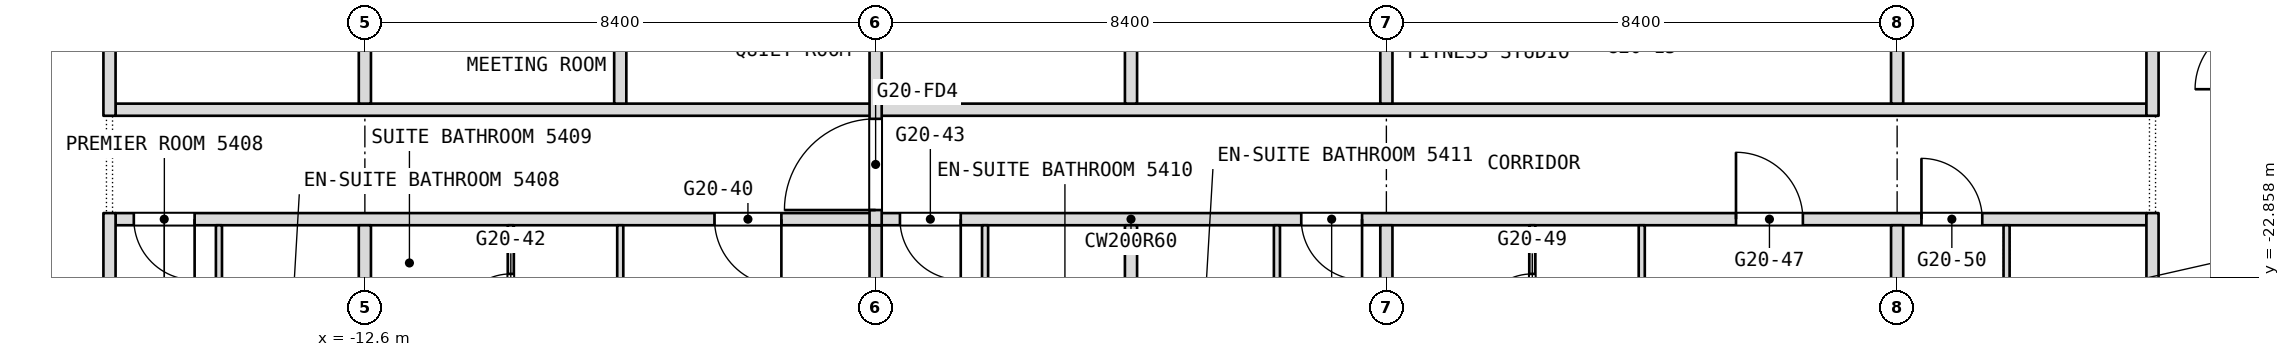
"""IFC4 building model, lengths in metres.
Left out: names, types, materials, properties, quantities, classifications, styles, units other than length and angle.
Written with IfcOpenShell. Run it as: python <this file> out.ifc"""

import sys

from ifc_helpers import new_model, si_unit, direction, frame, frame_2d, origin, place, context, subcontext, project, spatial, rectangle, extrude, element, fill, save


model = new_model("IFC4")
c1 = context("Model", 3, precision=1e-05, world=origin(), true_north=direction((0.0, 1.0)))
c2 = subcontext(c1, "Body", "Model", "MODEL_VIEW")
j1 = project(units=[si_unit("LENGTHUNIT", "METRE"), si_unit("PLANEANGLEUNIT", "RADIAN")], contexts=[c1])
p1 = place(None, origin())
s1 = spatial("IfcSite", under=j1, at=p1, CompositionType="ELEMENT")
p2 = place(p1, origin())
s2 = spatial("IfcBuilding", under=s1, at=p2, CompositionType="ELEMENT")
p3 = place(p2, frame((0.0, 0.0, 230.9)))
s3 = spatial("IfcBuildingStorey", under=s2, at=p3, CompositionType="ELEMENT", Elevation=230.9)
p4 = place(p3, frame((-16.7, -21.9, 0.0), z_axis=(0.0, 0.0, 1.0), x_axis=(1.0, 0.0, 0.0)))
e1 = element("IfcWall", 1, at=p4, inside=s3, PredefinedType="PARTITIONING", context=c2, shape_type="SweptSolid", body=[
    extrude(rectangle(XDim=33.4, YDim=0.2, at=frame_2d((16.7, 0.0))), origin(), (0.0, 0.0, 1.0), 3.34),
])
p5 = place(p4, frame((0.3, 0.0, 0.0)))
e2 = element("IfcOpeningElement", 2, at=p5, cuts=e1, PredefinedType="OPENING", context=c2, shape_type="SweptSolid", body=[
    extrude(rectangle(XDim=1.0, YDim=2.1, at=frame_2d((0.5, 1.05))), frame((0.0, 0.1, 0.0), z_axis=(0.0, -1.0, 0.0), x_axis=(1.0, 0.0, 0.0)), (0.0, 0.0, 1.0), 0.2),
])
p6 = place(p4, frame((9.85, 0.0, 0.0)))
e3 = element("IfcOpeningElement", 3, at=p6, cuts=e1, PredefinedType="OPENING", context=c2, shape_type="SweptSolid", body=[
    extrude(rectangle(XDim=1.1, YDim=2.1, at=frame_2d((0.55, 1.05))), frame((0.0, 0.1, 0.0), z_axis=(0.0, -1.0, 0.0), x_axis=(1.0, 0.0, 0.0)), (0.0, 0.0, 1.0), 0.2),
])
p7 = place(p4, frame((12.9, 0.0, 0.0)))
e4 = element("IfcOpeningElement", 4, at=p7, cuts=e1, PredefinedType="OPENING", context=c2, shape_type="SweptSolid", body=[
    extrude(rectangle(XDim=1.0, YDim=2.1, at=frame_2d((0.5, 1.05))), frame((0.0, 0.1, 0.0), z_axis=(0.0, -1.0, 0.0), x_axis=(1.0, 0.0, 0.0)), (0.0, 0.0, 1.0), 0.2),
])
p8 = place(p4, frame((19.5, 0.0, 0.0)))
e5 = element("IfcOpeningElement", 5, at=p8, cuts=e1, PredefinedType="OPENING", context=c2, shape_type="SweptSolid", body=[
    extrude(rectangle(XDim=1.0, YDim=2.1, at=frame_2d((0.5, 1.05))), frame((0.0, 0.1, 0.0), z_axis=(0.0, -1.0, 0.0), x_axis=(1.0, 0.0, 0.0)), (0.0, 0.0, 1.0), 0.2),
])
p9 = place(p4, frame((26.65, 0.0, 0.0)))
e6 = element("IfcOpeningElement", 6, at=p9, cuts=e1, PredefinedType="OPENING", context=c2, shape_type="SweptSolid", body=[
    extrude(rectangle(XDim=1.1, YDim=2.1, at=frame_2d((0.55, 1.05))), frame((0.0, 0.1, 0.0), z_axis=(0.0, -1.0, 0.0), x_axis=(1.0, 0.0, 0.0)), (0.0, 0.0, 1.0), 0.2),
])
p10 = place(p4, frame((29.7, 0.0, 0.0)))
e7 = element("IfcOpeningElement", 7, at=p10, cuts=e1, PredefinedType="OPENING", context=c2, shape_type="SweptSolid", body=[
    extrude(rectangle(XDim=1.0, YDim=2.1, at=frame_2d((0.5, 1.05))), frame((0.0, 0.1, 0.0), z_axis=(0.0, -1.0, 0.0), x_axis=(1.0, 0.0, 0.0)), (0.0, 0.0, 1.0), 0.2),
])
p11 = place(p3, frame((-16.7, -20.1, 0.0), z_axis=(0.0, 0.0, 1.0), x_axis=(1.0, 0.0, 0.0)))
e8 = element("IfcWall", 8, at=p11, inside=s3, PredefinedType="PARTITIONING", context=c2, shape_type="SweptSolid", body=[
    extrude(rectangle(XDim=33.4, YDim=0.2, at=frame_2d((16.7, 0.0))), origin(), (0.0, 0.0, 1.0), 3.34),
])
p12 = place(p3, frame((16.8, -27.229, 0.0), z_axis=(0.0, 0.0, 1.0), x_axis=(0.0, 1.0, 0.0)))
e9 = element("IfcWall", 9, at=p12, inside=s3, PredefinedType="PARTITIONING", context=c2, shape_type="SweptSolid", body=[
    extrude(rectangle(XDim=5.429, YDim=0.2, at=frame_2d((2.714, 0.0))), origin(), (0.0, 0.0, 1.0), 3.34),
])
p13 = place(p3, frame((16.8, -20.2, 0.0), z_axis=(0.0, 0.0, 1.0), x_axis=(0.0, 1.0, 0.0)))
e10 = element("IfcWall", 10, at=p13, inside=s3, PredefinedType="PARTITIONING", context=c2, shape_type="SweptSolid", body=[
    extrude(rectangle(XDim=6.8, YDim=0.2, at=frame_2d((3.4, 0.0))), origin(), (0.0, 0.0, 1.0), 3.34),
])
p14 = place(p3, frame((14.4, -25.35, 0.0), z_axis=(0.0, 0.0, 1.0), x_axis=(0.0, 1.0, 0.0)))
e11 = element("IfcWall", 11, at=p14, inside=s3, PredefinedType="PARTITIONING", context=c2, shape_type="SweptSolid", body=[
    extrude(rectangle(XDim=3.35, YDim=0.1, at=frame_2d((1.675, 0.0))), origin(), (0.0, 0.0, 1.0), 3.34),
])
p15 = place(p3, frame((12.6, -28.343, 0.0), z_axis=(0.0, 0.0, 1.0), x_axis=(0.0, 1.0, 0.0)))
e12 = element("IfcWall", 12, at=p15, inside=s3, PredefinedType="PARTITIONING", context=c2, shape_type="SweptSolid", body=[
    extrude(rectangle(XDim=6.343, YDim=0.2, at=frame_2d((3.171, 0.0))), origin(), (0.0, 0.0, 1.0), 3.34),
])
p16 = place(p3, frame((12.6, -20.0, 0.0), z_axis=(0.0, 0.0, 1.0), x_axis=(0.0, 1.0, 0.0)))
e13 = element("IfcWall", 13, at=p16, inside=s3, PredefinedType="PARTITIONING", context=c2, shape_type="SweptSolid", body=[
    extrude(rectangle(XDim=1.5, YDim=0.2, at=frame_2d((0.75, 0.0))), origin(), (0.0, 0.0, 1.0), 3.34),
])
p17 = place(p3, frame((8.4, -28.9, 0.0), z_axis=(0.0, 0.0, 1.0), x_axis=(0.0, 1.0, 0.0)))
e14 = element("IfcWall", 14, at=p17, inside=s3, PredefinedType="PARTITIONING", context=c2, shape_type="SweptSolid", body=[
    extrude(rectangle(XDim=6.9, YDim=0.1, at=frame_2d((3.45, 0.0))), origin(), (0.0, 0.0, 1.0), 3.34),
])
p18 = place(p17, frame((2.53, 0.0, 0.0)))
e15 = element("IfcOpeningElement", 15, at=p18, cuts=e14, PredefinedType="OPENING", context=c2, shape_type="SweptSolid", body=[
    extrude(rectangle(XDim=0.9, YDim=2.1, at=frame_2d((0.45, 1.05))), frame((0.0, 0.05, 0.0), z_axis=(0.0, -1.0, 0.0), x_axis=(1.0, 0.0, 0.0)), (0.0, 0.0, 1.0), 0.1),
])
p19 = place(p3, frame((6.6, -24.55, 0.0), z_axis=(0.0, 0.0, 1.0), x_axis=(0.0, 1.0, 0.0)))
e16 = element("IfcWall", 16, at=p19, inside=s3, PredefinedType="PARTITIONING", context=c2, shape_type="SweptSolid", body=[
    extrude(rectangle(XDim=2.55, YDim=0.1, at=frame_2d((1.275, 0.0))), origin(), (0.0, 0.0, 1.0), 3.34),
])
p20 = place(p19, frame((0.85, 0.0, 0.0)))
e17 = element("IfcOpeningElement", 17, at=p20, cuts=e16, PredefinedType="OPENING", context=c2, shape_type="SweptSolid", body=[
    extrude(rectangle(XDim=0.9, YDim=2.1, at=frame_2d((0.45, 1.05))), frame((0.0, 0.05, 0.0), z_axis=(0.0, -1.0, 0.0), x_axis=(1.0, 0.0, 0.0)), (0.0, 0.0, 1.0), 0.1),
])
p21 = place(p3, frame((4.2, -28.9, 0.0), z_axis=(0.0, 0.0, 1.0), x_axis=(0.0, 1.0, 0.0)))
e18 = element("IfcWall", 18, at=p21, inside=s3, PredefinedType="PARTITIONING", context=c2, shape_type="SweptSolid", body=[
    extrude(rectangle(XDim=6.9, YDim=0.2, at=frame_2d((3.45, 0.0))), origin(), (0.0, 0.0, 1.0), 3.34),
])
p22 = place(p3, frame((4.2, -20.0, 0.0), z_axis=(0.0, 0.0, 1.0), x_axis=(0.0, 1.0, 0.0)))
e19 = element("IfcWall", 19, at=p22, inside=s3, PredefinedType="PARTITIONING", context=c2, shape_type="SweptSolid", body=[
    extrude(rectangle(XDim=6.4, YDim=0.2, at=frame_2d((3.2, 0.0))), origin(), (0.0, 0.0, 1.0), 3.34),
])
p23 = place(p3, frame((2.4, -25.25, 0.0), z_axis=(0.0, 0.0, 1.0), x_axis=(0.0, 1.0, 0.0)))
e20 = element("IfcWall", 20, at=p23, inside=s3, PredefinedType="PARTITIONING", context=c2, shape_type="SweptSolid", body=[
    extrude(rectangle(XDim=3.25, YDim=0.1, at=frame_2d((1.625, 0.0))), origin(), (0.0, 0.0, 1.0), 3.34),
])
p24 = place(p3, frame((0.0, -28.9, 0.0), z_axis=(0.0, 0.0, 1.0), x_axis=(0.0, 1.0, 0.0)))
e21 = element("IfcWall", 21, at=p24, inside=s3, PredefinedType="PARTITIONING", context=c2, shape_type="SweptSolid", body=[
    extrude(rectangle(XDim=6.9, YDim=0.2, at=frame_2d((3.45, 0.0))), origin(), (0.0, 0.0, 1.0), 3.34),
])
p25 = place(p3, frame((0.0, -20.0, 0.0), z_axis=(0.0, 0.0, 1.0), x_axis=(0.0, 1.0, 0.0)))
e22 = element("IfcWall", 22, at=p25, inside=s3, PredefinedType="PARTITIONING", context=c2, shape_type="SweptSolid", body=[
    extrude(rectangle(XDim=6.4, YDim=0.2, at=frame_2d((3.2, 0.0))), origin(), (0.0, 0.0, 1.0), 3.34),
])
p26 = place(p3, frame((-2.4, -24.95, 0.0), z_axis=(0.0, 0.0, 1.0), x_axis=(0.0, 1.0, 0.0)))
e23 = element("IfcWall", 23, at=p26, inside=s3, PredefinedType="PARTITIONING", context=c2, shape_type="SweptSolid", body=[
    extrude(rectangle(XDim=2.95, YDim=0.1, at=frame_2d((1.475, 0.0))), origin(), (0.0, 0.0, 1.0), 3.34),
])
p27 = place(p3, frame((-4.2, -28.9, 0.0), z_axis=(0.0, 0.0, 1.0), x_axis=(0.0, 1.0, 0.0)))
e24 = element("IfcWall", 24, at=p27, inside=s3, PredefinedType="PARTITIONING", context=c2, shape_type="SweptSolid", body=[
    extrude(rectangle(XDim=6.9, YDim=0.2, at=frame_2d((3.45, 0.0))), origin(), (0.0, 0.0, 1.0), 3.34),
])
p28 = place(p3, frame((-4.2, -22.0, 0.0), z_axis=(0.0, 0.0, 1.0), x_axis=(0.0, 1.0, 0.0)))
e25 = element("IfcWall", 25, at=p28, inside=s3, PredefinedType="PARTITIONING", context=c2, shape_type="SweptSolid", body=[
    extrude(rectangle(XDim=8.4, YDim=0.2, at=frame_2d((4.2, 0.0))), origin(), (0.0, 0.0, 1.0), 3.34),
])
p29 = place(p28, frame((0.25, 0.0, 0.0)))
e26 = element("IfcOpeningElement", 26, at=p29, cuts=e25, PredefinedType="OPENING", context=c2, shape_type="SweptSolid", body=[
    extrude(rectangle(XDim=1.5, YDim=2.1, at=frame_2d((0.75, 1.05))), frame((0.0, 0.1, 0.0), z_axis=(0.0, -1.0, 0.0), x_axis=(1.0, 0.0, 0.0)), (0.0, 0.0, 1.0), 0.2),
])
p30 = place(p3, frame((-8.4, -28.9, 0.0), z_axis=(0.0, 0.0, 1.0), x_axis=(0.0, 1.0, 0.0)))
e27 = element("IfcWall", 27, at=p30, inside=s3, PredefinedType="PARTITIONING", context=c2, shape_type="SweptSolid", body=[
    extrude(rectangle(XDim=6.9, YDim=0.1, at=frame_2d((3.45, 0.0))), origin(), (0.0, 0.0, 1.0), 3.34),
])
p31 = place(p30, frame((2.53, 0.0, 0.0)))
e28 = element("IfcOpeningElement", 28, at=p31, cuts=e27, PredefinedType="OPENING", context=c2, shape_type="SweptSolid", body=[
    extrude(rectangle(XDim=0.9, YDim=2.1, at=frame_2d((0.45, 1.05))), frame((0.0, 0.05, 0.0), z_axis=(0.0, -1.0, 0.0), x_axis=(1.0, 0.0, 0.0)), (0.0, 0.0, 1.0), 0.1),
])
p32 = place(p3, frame((-8.4, -20.0, 0.0), z_axis=(0.0, 0.0, 1.0), x_axis=(0.0, 1.0, 0.0)))
e29 = element("IfcWall", 29, at=p32, inside=s3, PredefinedType="PARTITIONING", context=c2, shape_type="SweptSolid", body=[
    extrude(rectangle(XDim=1.5, YDim=0.2, at=frame_2d((0.75, 0.0))), origin(), (0.0, 0.0, 1.0), 3.34),
])
p33 = place(p3, frame((-10.2, -24.55, 0.0), z_axis=(0.0, 0.0, 1.0), x_axis=(0.0, 1.0, 0.0)))
e30 = element("IfcWall", 30, at=p33, inside=s3, PredefinedType="PARTITIONING", context=c2, shape_type="SweptSolid", body=[
    extrude(rectangle(XDim=2.55, YDim=0.1, at=frame_2d((1.275, 0.0))), origin(), (0.0, 0.0, 1.0), 3.34),
])
p34 = place(p33, frame((0.85, 0.0, 0.0)))
e31 = element("IfcOpeningElement", 31, at=p34, cuts=e30, PredefinedType="OPENING", context=c2, shape_type="SweptSolid", body=[
    extrude(rectangle(XDim=0.9, YDim=2.1, at=frame_2d((0.45, 1.05))), frame((0.0, 0.05, 0.0), z_axis=(0.0, -1.0, 0.0), x_axis=(1.0, 0.0, 0.0)), (0.0, 0.0, 1.0), 0.1),
])
p35 = place(p3, frame((-12.6, -28.343, 0.0), z_axis=(0.0, 0.0, 1.0), x_axis=(0.0, 1.0, 0.0)))
e32 = element("IfcWall", 32, at=p35, inside=s3, PredefinedType="PARTITIONING", context=c2, shape_type="SweptSolid", body=[
    extrude(rectangle(XDim=6.343, YDim=0.2, at=frame_2d((3.171, 0.0))), origin(), (0.0, 0.0, 1.0), 3.34),
])
p36 = place(p3, frame((-12.6, -20.0, 0.0), z_axis=(0.0, 0.0, 1.0), x_axis=(0.0, 1.0, 0.0)))
e33 = element("IfcWall", 33, at=p36, inside=s3, PredefinedType="PARTITIONING", context=c2, shape_type="SweptSolid", body=[
    extrude(rectangle(XDim=1.5, YDim=0.2, at=frame_2d((0.75, 0.0))), origin(), (0.0, 0.0, 1.0), 3.34),
])
p37 = place(p3, frame((-15.0, -25.85, 0.0), z_axis=(0.0, 0.0, 1.0), x_axis=(0.0, 1.0, 0.0)))
e34 = element("IfcWall", 34, at=p37, inside=s3, PredefinedType="PARTITIONING", context=c2, shape_type="SweptSolid", body=[
    extrude(rectangle(XDim=3.85, YDim=0.1, at=frame_2d((1.925, 0.0))), origin(), (0.0, 0.0, 1.0), 3.34),
])
p38 = place(p3, frame((-16.8, -27.229, 0.0), z_axis=(0.0, 0.0, 1.0), x_axis=(0.0, 1.0, 0.0)))
e35 = element("IfcWall", 35, at=p38, inside=s3, PredefinedType="PARTITIONING", context=c2, shape_type="SweptSolid", body=[
    extrude(rectangle(XDim=5.429, YDim=0.2, at=frame_2d((2.714, 0.0))), origin(), (0.0, 0.0, 1.0), 3.34),
])
p39 = place(p3, frame((-16.8, -20.2, 0.0), z_axis=(0.0, 0.0, 1.0), x_axis=(0.0, 1.0, 0.0)))
e36 = element("IfcWall", 36, at=p39, inside=s3, PredefinedType="PARTITIONING", context=c2, shape_type="SweptSolid", body=[
    extrude(rectangle(XDim=6.8, YDim=0.2, at=frame_2d((3.4, 0.0))), origin(), (0.0, 0.0, 1.0), 3.34),
])
p40 = place(p5, origin())
e37 = element("IfcDoor", 37, at=p40, inside=s3, OperationType="SINGLE_SWING_RIGHT", PredefinedType="DOOR", context=c2, shape_type="SweptSolid", body=[
    extrude(rectangle(XDim=1.0, YDim=2.1, at=frame_2d((0.5, 1.05))), frame((0.0, 0.025, 0.0), z_axis=(0.0, -1.0, 0.0), x_axis=(1.0, 0.0, 0.0)), (0.0, 0.0, 1.0), 0.05),
])
fill(e2, e37)
p41 = place(p6, origin())
e38 = element("IfcDoor", 38, at=p41, inside=s3, OperationType="SINGLE_SWING_RIGHT", PredefinedType="DOOR", context=c2, shape_type="SweptSolid", body=[
    extrude(rectangle(XDim=1.1, YDim=2.1, at=frame_2d((0.55, 1.05))), frame((0.0, 0.025, 0.0), z_axis=(0.0, -1.0, 0.0), x_axis=(1.0, 0.0, 0.0)), (0.0, 0.0, 1.0), 0.05),
])
fill(e3, e38)
p42 = place(p7, origin())
e39 = element("IfcDoor", 39, at=p42, inside=s3, OperationType="SINGLE_SWING_LEFT", PredefinedType="DOOR", context=c2, shape_type="SweptSolid", body=[
    extrude(rectangle(XDim=1.0, YDim=2.1, at=frame_2d((0.5, 1.05))), frame((0.0, 0.025, 0.0), z_axis=(0.0, -1.0, 0.0), x_axis=(1.0, 0.0, 0.0)), (0.0, 0.0, 1.0), 0.05),
])
fill(e4, e39)
p43 = place(p8, origin())
e40 = element("IfcDoor", 40, at=p43, inside=s3, OperationType="SINGLE_SWING_LEFT", PredefinedType="DOOR", context=c2, shape_type="SweptSolid", body=[
    extrude(rectangle(XDim=1.0, YDim=2.1, at=frame_2d((0.5, 1.05))), frame((0.0, 0.025, 0.0), z_axis=(0.0, -1.0, 0.0), x_axis=(1.0, 0.0, 0.0)), (0.0, 0.0, 1.0), 0.05),
])
fill(e5, e40)
p44 = place(p9, origin())
e41 = element("IfcDoor", 41, at=p44, inside=s3, OperationType="SINGLE_SWING_LEFT", PredefinedType="DOOR", context=c2, shape_type="SweptSolid", body=[
    extrude(rectangle(XDim=1.1, YDim=2.1, at=frame_2d((0.55, 1.05))), frame((0.0, 0.025, 0.0), z_axis=(0.0, -1.0, 0.0), x_axis=(1.0, 0.0, 0.0)), (0.0, 0.0, 1.0), 0.05),
])
fill(e6, e41)
p45 = place(p10, origin())
e42 = element("IfcDoor", 42, at=p45, inside=s3, OperationType="SINGLE_SWING_RIGHT", PredefinedType="DOOR", context=c2, shape_type="SweptSolid", body=[
    extrude(rectangle(XDim=1.0, YDim=2.1, at=frame_2d((0.5, 1.05))), frame((0.0, 0.025, 0.0), z_axis=(0.0, -1.0, 0.0), x_axis=(1.0, 0.0, 0.0)), (0.0, 0.0, 1.0), 0.05),
])
fill(e7, e42)
p46 = place(p20, origin())
e43 = element("IfcDoor", 43, at=p46, inside=s3, OperationType="SINGLE_SWING_RIGHT", PredefinedType="DOOR", context=c2, shape_type="SweptSolid", body=[
    extrude(rectangle(XDim=0.9, YDim=2.1, at=frame_2d((0.45, 1.05))), frame((0.0, 0.025, 0.0), z_axis=(0.0, -1.0, 0.0), x_axis=(1.0, 0.0, 0.0)), (0.0, 0.0, 1.0), 0.05),
])
fill(e17, e43)
p47 = place(p34, origin())
e44 = element("IfcDoor", 44, at=p47, inside=s3, OperationType="SINGLE_SWING_RIGHT", PredefinedType="DOOR", context=c2, shape_type="SweptSolid", body=[
    extrude(rectangle(XDim=0.9, YDim=2.1, at=frame_2d((0.45, 1.05))), frame((0.0, 0.025, 0.0), z_axis=(0.0, -1.0, 0.0), x_axis=(1.0, 0.0, 0.0)), (0.0, 0.0, 1.0), 0.05),
])
fill(e31, e44)
p48 = place(p29, origin())
e45 = element("IfcDoor", 45, at=p48, inside=s3, OperationType="DOUBLE_DOOR_DOUBLE_SWING", PredefinedType="DOOR", context=c2, shape_type="SweptSolid", body=[
    extrude(rectangle(XDim=1.5, YDim=2.1, at=frame_2d((0.75, 1.05))), frame((0.0, 0.025, 0.0), z_axis=(0.0, -1.0, 0.0), x_axis=(1.0, 0.0, 0.0)), (0.0, 0.0, 1.0), 0.05),
])
fill(e26, e45)
save(model, sys.argv[1])
